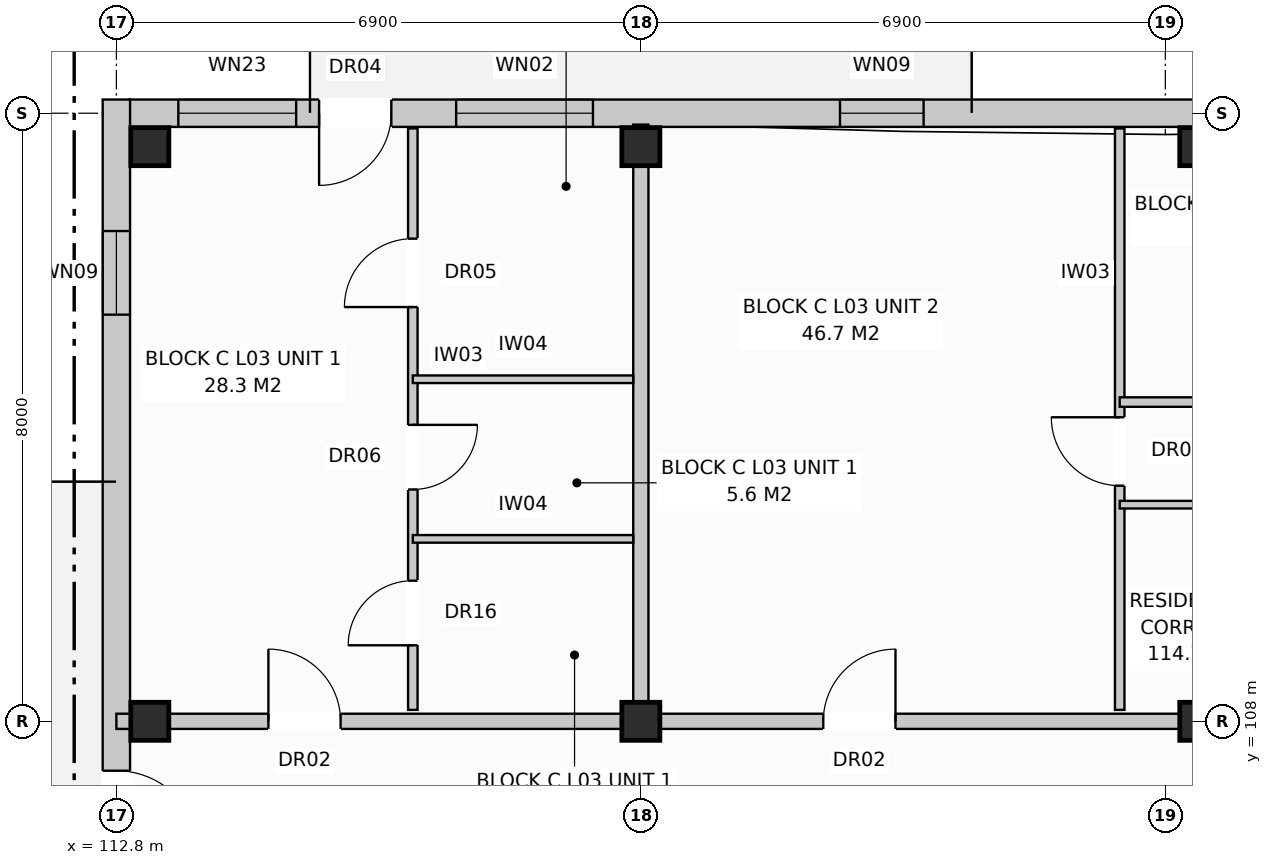
"""IFC4 building model, lengths in metres.
Left out: names, types, materials, properties, quantities, classifications, styles, units other than length and angle.
Written with IfcOpenShell. Run it as: python <this file> out.ifc"""

import sys

from ifc_helpers import new_model, si_unit, direction, frame, frame_2d, origin, origin_with_axes, origin_2d, place, context, subcontext, project, spatial, rectangle, extrude, element, fill, save


model = new_model("IFC4")
c1 = context("Model", 3, precision=1e-05, world=origin(), true_north=direction((0.0, 1.0)))
c2 = subcontext(c1, "Body", "Model", "MODEL_VIEW")
j1 = project(units=[si_unit("LENGTHUNIT", "METRE"), si_unit("PLANEANGLEUNIT", "RADIAN")], contexts=[c1])
p1 = place(None, origin())
s1 = spatial("IfcSite", under=j1, at=p1, CompositionType="ELEMENT")
p2 = place(p1, origin())
s2 = spatial("IfcBuilding", under=s1, at=p2, CompositionType="ELEMENT")
p3 = place(p2, frame((0.0, 0.0, 11.2)))
s3 = spatial("IfcBuildingStorey", under=s2, at=p3, CompositionType="ELEMENT", Elevation=11.2)
for number, where, z_axis, x_axis in (
    (1, (113.24, 108.0, 0.0), (0.0, 0.0, 1.0), (1.0, 0.0, 0.0)),
    (2, (113.24, 115.56, 0.0), (0.0, 0.0, 1.0), (1.0, 0.0, 0.0)),
    (3, (119.7, 108.0, 0.0), (0.0, 0.0, 1.0), (1.0, 0.0, 0.0)),
    (4, (119.7, 115.56, 0.0), (0.0, 0.0, 1.0), (1.0, 0.0, 0.0)),
    (5, (127.04, 108.0, 0.0), (0.0, 0.0, 1.0), (1.0, 0.0, 0.0)),
    (6, (127.04, 115.56, 0.0), (0.0, 0.0, 1.0), (1.0, 0.0, 0.0)),
):
    element("IfcColumn", number, at=place(p3, frame(where, z_axis=z_axis, x_axis=x_axis)), inside=s3, PredefinedType="COLUMN", context=c2, shape_type="SweptSolid", body=[
        extrude(rectangle(XDim=0.5, YDim=0.5, at=origin_2d()), origin(), (0.0, 0.0, 1.0), 3.2),
    ])
p4 = place(p3, frame((112.97, 116.0, 0.0), z_axis=(0.0, 0.0, 1.0), x_axis=(1.0, 0.0, 0.0)))
e7 = element("IfcWall", 7, at=p4, inside=s3, PredefinedType="STANDARD", context=c2, shape_type="SweptSolid", body=[
    extrude(rectangle(XDim=54.86, YDim=0.36, at=frame_2d((27.43, 0.0))), origin(), (0.0, 0.0, 1.0), 2.94),
])
p5 = place(p4, frame((2.497, 0.0, 0.0)))
e8 = element("IfcOpeningElement", 8, at=p5, cuts=e7, PredefinedType="OPENING", context=c2, shape_type="SweptSolid", body=[
    extrude(rectangle(XDim=0.95, YDim=2.1, at=frame_2d((0.475, 1.05))), frame((0.0, 0.192, 0.0), z_axis=(0.0, -1.0, 0.0), x_axis=(1.0, 0.0, 0.0)), (0.0, 0.0, 1.0), 0.384),
])
p6 = place(p4, frame((17.026, 0.0, 0.0)))
e9 = element("IfcOpeningElement", 9, at=p6, cuts=e7, PredefinedType="OPENING", context=c2, shape_type="SweptSolid", body=[
    extrude(rectangle(XDim=0.95, YDim=2.1, at=frame_2d((0.475, 1.05))), frame((0.0, 0.192, 0.0), z_axis=(0.0, -1.0, 0.0), x_axis=(1.0, 0.0, 0.0)), (0.0, 0.0, 1.0), 0.384),
])
p7 = place(p4, frame((30.126, 0.0, 0.0)))
e10 = element("IfcOpeningElement", 10, at=p7, cuts=e7, PredefinedType="OPENING", context=c2, shape_type="SweptSolid", body=[
    extrude(rectangle(XDim=0.95, YDim=2.1, at=frame_2d((0.475, 1.05))), frame((0.0, 0.192, 0.0), z_axis=(0.0, -1.0, 0.0), x_axis=(1.0, 0.0, 0.0)), (0.0, 0.0, 1.0), 0.384),
])
p8 = place(p4, frame((44.226, 0.0, 0.0)))
e11 = element("IfcOpeningElement", 11, at=p8, cuts=e7, PredefinedType="OPENING", context=c2, shape_type="SweptSolid", body=[
    extrude(rectangle(XDim=0.95, YDim=2.1, at=frame_2d((0.475, 1.05))), frame((0.0, 0.192, 0.0), z_axis=(0.0, -1.0, 0.0), x_axis=(1.0, 0.0, 0.0)), (0.0, 0.0, 1.0), 0.384),
])
p9 = place(p4, frame((0.645, 0.0, 0.85)))
e12 = element("IfcOpeningElement", 12, at=p9, cuts=e7, PredefinedType="OPENING", context=c2, shape_type="SweptSolid", body=[
    extrude(rectangle(XDim=1.55, YDim=1.55, at=frame_2d((0.775, 0.775))), frame((0.0, 0.192, 0.0), z_axis=(0.0, -1.0, 0.0), x_axis=(1.0, 0.0, 0.0)), (0.0, 0.0, 1.0), 0.384),
])
p10 = place(p4, frame((4.3, 0.0, 0.8)))
e13 = element("IfcOpeningElement", 13, at=p10, cuts=e7, PredefinedType="OPENING", context=c2, shape_type="SweptSolid", body=[
    extrude(rectangle(XDim=1.8, YDim=1.7, at=frame_2d((0.9, 0.85))), frame((0.0, 0.192, 0.0), z_axis=(0.0, -1.0, 0.0), x_axis=(1.0, 0.0, 0.0)), (0.0, 0.0, 1.0), 0.384),
])
p11 = place(p4, frame((9.35, 0.0, 0.72)))
e14 = element("IfcOpeningElement", 14, at=p11, cuts=e7, PredefinedType="OPENING", context=c2, shape_type="SweptSolid", body=[
    extrude(rectangle(XDim=1.1, YDim=1.5, at=frame_2d((0.55, 0.75))), frame((0.0, 0.192, 0.0), z_axis=(0.0, -1.0, 0.0), x_axis=(1.0, 0.0, 0.0)), (0.0, 0.0, 1.0), 0.384),
])
p12 = place(p4, frame((15.05, 0.0, 0.72)))
e15 = element("IfcOpeningElement", 15, at=p12, cuts=e7, PredefinedType="OPENING", context=c2, shape_type="SweptSolid", body=[
    extrude(rectangle(XDim=1.1, YDim=1.5, at=frame_2d((0.55, 0.75))), frame((0.0, 0.192, 0.0), z_axis=(0.0, -1.0, 0.0), x_axis=(1.0, 0.0, 0.0)), (0.0, 0.0, 1.0), 0.384),
])
p13 = place(p4, frame((21.1, 0.0, 0.8)))
e16 = element("IfcOpeningElement", 16, at=p13, cuts=e7, PredefinedType="OPENING", context=c2, shape_type="SweptSolid", body=[
    extrude(rectangle(XDim=1.8, YDim=1.7, at=frame_2d((0.9, 0.85))), frame((0.0, 0.192, 0.0), z_axis=(0.0, -1.0, 0.0), x_axis=(1.0, 0.0, 0.0)), (0.0, 0.0, 1.0), 0.384),
])
p14 = place(p4, frame((24.85, 0.0, 0.72)))
e17 = element("IfcOpeningElement", 17, at=p14, cuts=e7, PredefinedType="OPENING", context=c2, shape_type="SweptSolid", body=[
    extrude(rectangle(XDim=1.1, YDim=1.5, at=frame_2d((0.55, 0.75))), frame((0.0, 0.192, 0.0), z_axis=(0.0, -1.0, 0.0), x_axis=(1.0, 0.0, 0.0)), (0.0, 0.0, 1.0), 0.384),
])
p15 = place(p4, frame((28.35, 0.0, 0.72)))
e18 = element("IfcOpeningElement", 18, at=p15, cuts=e7, PredefinedType="OPENING", context=c2, shape_type="SweptSolid", body=[
    extrude(rectangle(XDim=1.1, YDim=1.5, at=frame_2d((0.55, 0.75))), frame((0.0, 0.192, 0.0), z_axis=(0.0, -1.0, 0.0), x_axis=(1.0, 0.0, 0.0)), (0.0, 0.0, 1.0), 0.384),
])
p16 = place(p4, frame((31.9, 0.0, 0.8)))
e19 = element("IfcOpeningElement", 19, at=p16, cuts=e7, PredefinedType="OPENING", context=c2, shape_type="SweptSolid", body=[
    extrude(rectangle(XDim=1.8, YDim=1.7, at=frame_2d((0.9, 0.85))), frame((0.0, 0.192, 0.0), z_axis=(0.0, -1.0, 0.0), x_axis=(1.0, 0.0, 0.0)), (0.0, 0.0, 1.0), 0.384),
])
p17 = place(p4, frame((35.55, 0.0, 0.72)))
e20 = element("IfcOpeningElement", 20, at=p17, cuts=e7, PredefinedType="OPENING", context=c2, shape_type="SweptSolid", body=[
    extrude(rectangle(XDim=1.9, YDim=1.85, at=frame_2d((0.95, 0.925))), frame((0.0, 0.192, 0.0), z_axis=(0.0, -1.0, 0.0), x_axis=(1.0, 0.0, 0.0)), (0.0, 0.0, 1.0), 0.384),
])
p18 = place(p4, frame((39.25, 0.0, 0.72)))
e21 = element("IfcOpeningElement", 21, at=p18, cuts=e7, PredefinedType="OPENING", context=c2, shape_type="SweptSolid", body=[
    extrude(rectangle(XDim=1.1, YDim=1.5, at=frame_2d((0.55, 0.75))), frame((0.0, 0.192, 0.0), z_axis=(0.0, -1.0, 0.0), x_axis=(1.0, 0.0, 0.0)), (0.0, 0.0, 1.0), 0.384),
])
p19 = place(p4, frame((42.45, 0.0, 0.72)))
e22 = element("IfcOpeningElement", 22, at=p19, cuts=e7, PredefinedType="OPENING", context=c2, shape_type="SweptSolid", body=[
    extrude(rectangle(XDim=1.1, YDim=1.5, at=frame_2d((0.55, 0.75))), frame((0.0, 0.192, 0.0), z_axis=(0.0, -1.0, 0.0), x_axis=(1.0, 0.0, 0.0)), (0.0, 0.0, 1.0), 0.384),
])
p20 = place(p4, frame((45.75, 0.0, 0.72)))
e23 = element("IfcOpeningElement", 23, at=p20, cuts=e7, PredefinedType="OPENING", context=c2, shape_type="SweptSolid", body=[
    extrude(rectangle(XDim=1.9, YDim=1.85, at=frame_2d((0.95, 0.925))), frame((0.0, 0.192, 0.0), z_axis=(0.0, -1.0, 0.0), x_axis=(1.0, 0.0, 0.0)), (0.0, 0.0, 1.0), 0.384),
])
p21 = place(p4, frame((51.85, 0.0, 0.72)))
e24 = element("IfcOpeningElement", 24, at=p21, cuts=e7, PredefinedType="OPENING", context=c2, shape_type="SweptSolid", body=[
    extrude(rectangle(XDim=1.1, YDim=1.5, at=frame_2d((0.55, 0.75))), frame((0.0, 0.192, 0.0), z_axis=(0.0, -1.0, 0.0), x_axis=(1.0, 0.0, 0.0)), (0.0, 0.0, 1.0), 0.384),
])
p22 = place(p3, frame((112.8, 97.42, 0.0), z_axis=(0.0, 0.0, 1.0), x_axis=(0.0, 1.0, 0.0)))
e25 = element("IfcWall", 25, at=p22, inside=s3, PredefinedType="STANDARD", context=c2, shape_type="SweptSolid", body=[
    extrude(rectangle(XDim=18.76, YDim=0.36, at=frame_2d((9.38, 0.0))), origin(), (0.0, 0.0, 1.0), 2.94),
])
p23 = place(p22, frame((8.83, 0.0, 0.0)))
e26 = element("IfcOpeningElement", 26, at=p23, cuts=e25, PredefinedType="OPENING", context=c2, shape_type="SweptSolid", body=[
    extrude(rectangle(XDim=1.1, YDim=2.1, at=frame_2d((0.55, 1.05))), frame((0.0, 0.192, 0.0), z_axis=(0.0, -1.0, 0.0), x_axis=(1.0, 0.0, 0.0)), (0.0, 0.0, 1.0), 0.384),
])
p24 = place(p22, frame((1.73, 0.0, 0.72)))
e27 = element("IfcOpeningElement", 27, at=p24, cuts=e25, PredefinedType="OPENING", context=c2, shape_type="SweptSolid", body=[
    extrude(rectangle(XDim=1.1, YDim=1.5, at=frame_2d((0.55, 0.75))), frame((0.0, 0.192, 0.0), z_axis=(0.0, -1.0, 0.0), x_axis=(1.0, 0.0, 0.0)), (0.0, 0.0, 1.0), 0.384),
])
p25 = place(p22, frame((15.93, 0.0, 0.72)))
e28 = element("IfcOpeningElement", 28, at=p25, cuts=e25, PredefinedType="OPENING", context=c2, shape_type="SweptSolid", body=[
    extrude(rectangle(XDim=1.1, YDim=1.5, at=frame_2d((0.55, 0.75))), frame((0.0, 0.192, 0.0), z_axis=(0.0, -1.0, 0.0), x_axis=(1.0, 0.0, 0.0)), (0.0, 0.0, 1.0), 0.384),
])
p26 = place(p3, frame((119.7, 108.15, 0.0), z_axis=(0.0, 0.0, 1.0), x_axis=(0.0, 1.0, 0.0)))
e29 = element("IfcWall", 29, at=p26, inside=s3, PredefinedType="PARTITIONING", context=c2, shape_type="SweptSolid", body=[
    extrude(rectangle(XDim=7.7, YDim=0.2, at=frame_2d((3.85, 0.0))), origin(), (0.0, 0.0, 1.0), 2.38),
])
p27 = place(p3, frame((112.8, 108.0, 0.0), z_axis=(0.0, 0.0, 1.0), x_axis=(1.0, 0.0, 0.0)))
e30 = element("IfcWall", 30, at=p27, inside=s3, PredefinedType="PARTITIONING", context=c2, shape_type="SweptSolid", body=[
    extrude(rectangle(XDim=6.9, YDim=0.2, at=frame_2d((3.45, 0.0))), origin(), (0.0, 0.0, 1.0), 2.38),
])
p28 = place(p27, frame((2.0, 0.0, 0.0)))
e31 = element("IfcOpeningElement", 31, at=p28, cuts=e30, PredefinedType="OPENING", context=c2, shape_type="SweptSolid", body=[
    extrude(rectangle(XDim=0.95, YDim=2.15, at=frame_2d((0.475, 1.075))), frame((0.0, 0.112, 0.0), z_axis=(0.0, -1.0, 0.0), x_axis=(1.0, 0.0, 0.0)), (0.0, 0.0, 1.0), 0.224),
])
p29 = place(p3, frame((116.7, 108.15, 0.0), z_axis=(0.0, 0.0, 1.0), x_axis=(0.0, 1.0, 0.0)))
e32 = element("IfcWall", 32, at=p29, inside=s3, PredefinedType="PARTITIONING", context=c2, shape_type="SweptSolid", body=[
    extrude(rectangle(XDim=7.65, YDim=0.125, at=frame_2d((3.825, 0.0))), origin(), (0.0, 0.0, 1.0), 2.94),
])
p30 = place(p29, frame((0.85, 0.0, 0.0)))
e33 = element("IfcOpeningElement", 33, at=p30, cuts=e32, PredefinedType="OPENING", context=c2, shape_type="SweptSolid", body=[
    extrude(rectangle(XDim=0.85, YDim=2.1, at=frame_2d((0.425, 1.05))), frame((0.0, 0.074, 0.0), z_axis=(0.0, -1.0, 0.0), x_axis=(1.0, 0.0, 0.0)), (0.0, 0.0, 1.0), 0.149),
])
p31 = place(p29, frame((2.9, 0.0, 0.0)))
e34 = element("IfcOpeningElement", 34, at=p31, cuts=e32, PredefinedType="OPENING", context=c2, shape_type="SweptSolid", body=[
    extrude(rectangle(XDim=0.85, YDim=2.05, at=frame_2d((0.425, 1.025))), frame((0.0, 0.074, 0.0), z_axis=(0.0, -1.0, 0.0), x_axis=(1.0, 0.0, 0.0)), (0.0, 0.0, 1.0), 0.149),
])
p32 = place(p29, frame((5.3, 0.0, 0.0)))
e35 = element("IfcOpeningElement", 35, at=p32, cuts=e32, PredefinedType="OPENING", context=c2, shape_type="SweptSolid", body=[
    extrude(rectangle(XDim=0.9, YDim=2.1, at=frame_2d((0.45, 1.05))), frame((0.0, 0.074, 0.0), z_axis=(0.0, -1.0, 0.0), x_axis=(1.0, 0.0, 0.0)), (0.0, 0.0, 1.0), 0.149),
])
for number, where, z_axis, x_axis in (
    (36, (116.7, 110.4, 0.0), (0.0, 0.0, 1.0), (1.0, 0.0, 0.0)),
    (37, (116.7, 112.5, 0.0), (0.0, 0.0, 1.0), (1.0, 0.0, 0.0)),
):
    element("IfcWall", number, at=place(p3, frame(where, z_axis=z_axis, x_axis=x_axis)), inside=s3, PredefinedType="PARTITIONING", context=c2, shape_type="SweptSolid", body=[
        extrude(rectangle(XDim=2.9, YDim=0.1, at=frame_2d((1.45, 0.0))), origin(), (0.0, 0.0, 1.0), 2.94),
    ])
p33 = place(p3, frame((119.7, 108.0, 0.0), z_axis=(0.0, 0.0, 1.0), x_axis=(1.0, 0.0, 0.0)))
e38 = element("IfcWall", 38, at=p33, inside=s3, PredefinedType="PARTITIONING", context=c2, shape_type="SweptSolid", body=[
    extrude(rectangle(XDim=20.7, YDim=0.2, at=frame_2d((10.35, 0.0))), origin(), (0.0, 0.0, 1.0), 2.38),
])
p34 = place(p33, frame((2.4, 0.0, 0.0)))
e39 = element("IfcOpeningElement", 39, at=p34, cuts=e38, PredefinedType="OPENING", context=c2, shape_type="SweptSolid", body=[
    extrude(rectangle(XDim=0.95, YDim=2.15, at=frame_2d((0.475, 1.075))), frame((0.0, 0.112, 0.0), z_axis=(0.0, -1.0, 0.0), x_axis=(1.0, 0.0, 0.0)), (0.0, 0.0, 1.0), 0.224),
])
p35 = place(p3, frame((126.0, 108.15, 0.0), z_axis=(0.0, 0.0, 1.0), x_axis=(0.0, 1.0, 0.0)))
e40 = element("IfcWall", 40, at=p35, inside=s3, PredefinedType="PARTITIONING", context=c2, shape_type="SweptSolid", body=[
    extrude(rectangle(XDim=7.65, YDim=0.125, at=frame_2d((3.825, 0.0))), origin(), (0.0, 0.0, 1.0), 2.94),
])
p36 = place(p35, frame((2.95, 0.0, 0.0)))
e41 = element("IfcOpeningElement", 41, at=p36, cuts=e40, PredefinedType="OPENING", context=c2, shape_type="SweptSolid", body=[
    extrude(rectangle(XDim=0.9, YDim=2.1, at=frame_2d((0.45, 1.05))), frame((0.0, 0.074, 0.0), z_axis=(0.0, -1.0, 0.0), x_axis=(1.0, 0.0, 0.0)), (0.0, 0.0, 1.0), 0.149),
])
p37 = place(p3, frame((126.0, 110.85, 0.0), z_axis=(0.0, 0.0, 1.0), x_axis=(1.0, 0.0, 0.0)))
e42 = element("IfcWall", 42, at=p37, inside=s3, PredefinedType="PARTITIONING", context=c2, shape_type="SweptSolid", body=[
    extrude(rectangle(XDim=14.3, YDim=0.1, at=frame_2d((7.15, 0.0))), origin(), (0.0, 0.0, 1.0), 2.94),
])
p38 = place(p37, frame((1.6, 0.0, 0.0)))
e43 = element("IfcOpeningElement", 43, at=p38, cuts=e42, PredefinedType="OPENING", context=c2, shape_type="SweptSolid", body=[
    extrude(rectangle(XDim=0.9, YDim=2.1, at=frame_2d((0.45, 1.05))), frame((0.0, 0.062, 0.0), z_axis=(0.0, -1.0, 0.0), x_axis=(1.0, 0.0, 0.0)), (0.0, 0.0, 1.0), 0.124),
])
p39 = place(p37, frame((5.1, 0.0, 0.0)))
e44 = element("IfcOpeningElement", 44, at=p39, cuts=e42, PredefinedType="OPENING", context=c2, shape_type="SweptSolid", body=[
    extrude(rectangle(XDim=0.85, YDim=2.05, at=frame_2d((0.425, 1.025))), frame((0.0, 0.062, 0.0), z_axis=(0.0, -1.0, 0.0), x_axis=(1.0, 0.0, 0.0)), (0.0, 0.0, 1.0), 0.124),
])
p40 = place(p37, frame((8.2, 0.0, 0.0)))
e45 = element("IfcOpeningElement", 45, at=p40, cuts=e42, PredefinedType="OPENING", context=c2, shape_type="SweptSolid", body=[
    extrude(rectangle(XDim=0.85, YDim=2.05, at=frame_2d((0.425, 1.025))), frame((0.0, 0.062, 0.0), z_axis=(0.0, -1.0, 0.0), x_axis=(1.0, 0.0, 0.0)), (0.0, 0.0, 1.0), 0.124),
])
p41 = place(p37, frame((11.6, 0.0, 0.0)))
e46 = element("IfcOpeningElement", 46, at=p41, cuts=e42, PredefinedType="OPENING", context=c2, shape_type="SweptSolid", body=[
    extrude(rectangle(XDim=0.85, YDim=2.05, at=frame_2d((0.425, 1.025))), frame((0.0, 0.062, 0.0), z_axis=(0.0, -1.0, 0.0), x_axis=(1.0, 0.0, 0.0)), (0.0, 0.0, 1.0), 0.124),
])
p42 = place(p3, frame((126.0, 112.2, 0.0), z_axis=(0.0, 0.0, 1.0), x_axis=(1.0, 0.0, 0.0)))
e47 = element("IfcWall", 47, at=p42, inside=s3, PredefinedType="PARTITIONING", context=c2, shape_type="SweptSolid", body=[
    extrude(rectangle(XDim=10.4, YDim=0.125, at=frame_2d((5.2, 0.0))), origin(), (0.0, 0.0, 1.0), 2.94),
])
p43 = place(p42, frame((2.0, 0.0, 0.0)))
e48 = element("IfcOpeningElement", 48, at=p43, cuts=e47, PredefinedType="OPENING", context=c2, shape_type="SweptSolid", body=[
    extrude(rectangle(XDim=0.9, YDim=2.1, at=frame_2d((0.45, 1.05))), frame((0.0, 0.074, 0.0), z_axis=(0.0, -1.0, 0.0), x_axis=(1.0, 0.0, 0.0)), (0.0, 0.0, 1.0), 0.149),
])
p44 = place(p42, frame((7.2, 0.0, 0.0)))
e49 = element("IfcOpeningElement", 49, at=p44, cuts=e47, PredefinedType="OPENING", context=c2, shape_type="SweptSolid", body=[
    extrude(rectangle(XDim=0.9, YDim=2.1, at=frame_2d((0.45, 1.05))), frame((0.0, 0.074, 0.0), z_axis=(0.0, -1.0, 0.0), x_axis=(1.0, 0.0, 0.0)), (0.0, 0.0, 1.0), 0.149),
])
p45 = place(p5, frame((0.95, 0.0, 0.0), z_axis=(0.0, 0.0, 1.0), x_axis=(-1.0, 0.0, 0.0)))
e50 = element("IfcDoor", 50, at=p45, inside=s3, OperationType="SINGLE_SWING_LEFT", PredefinedType="DOOR", context=c2, shape_type="SweptSolid", body=[
    extrude(rectangle(XDim=0.95, YDim=2.1, at=frame_2d((0.475, 1.05))), frame((0.0, 0.025, 0.0), z_axis=(0.0, -1.0, 0.0), x_axis=(1.0, 0.0, 0.0)), (0.0, 0.0, 1.0), 0.05),
])
fill(e8, e50)
p46 = place(p9, origin_with_axes())
e51 = element("IfcWindow", 51, at=p46, inside=s3, PartitioningType="SINGLE_PANEL", PredefinedType="WINDOW", context=c2, shape_type="SweptSolid", body=[
    extrude(rectangle(XDim=1.55, YDim=1.55, at=frame_2d((0.775, 0.775))), frame((0.0, 0.03, 0.0), z_axis=(0.0, -1.0, 0.0), x_axis=(1.0, 0.0, 0.0)), (0.0, 0.0, 1.0), 0.06),
])
fill(e12, e51)
p47 = place(p10, origin_with_axes())
e52 = element("IfcWindow", 52, at=p47, inside=s3, PartitioningType="SINGLE_PANEL", PredefinedType="WINDOW", context=c2, shape_type="SweptSolid", body=[
    extrude(rectangle(XDim=1.8, YDim=1.7, at=frame_2d((0.9, 0.85))), frame((0.0, 0.03, 0.0), z_axis=(0.0, -1.0, 0.0), x_axis=(1.0, 0.0, 0.0)), (0.0, 0.0, 1.0), 0.06),
])
fill(e13, e52)
p48 = place(p11, origin_with_axes())
e53 = element("IfcWindow", 53, at=p48, inside=s3, PartitioningType="SINGLE_PANEL", PredefinedType="WINDOW", context=c2, shape_type="SweptSolid", body=[
    extrude(rectangle(XDim=1.1, YDim=1.5, at=frame_2d((0.55, 0.75))), frame((0.0, 0.03, 0.0), z_axis=(0.0, -1.0, 0.0), x_axis=(1.0, 0.0, 0.0)), (0.0, 0.0, 1.0), 0.06),
])
fill(e14, e53)
p49 = place(p23, frame((1.1, 0.0, 0.0), z_axis=(0.0, 0.0, 1.0), x_axis=(-1.0, 0.0, 0.0)))
e54 = element("IfcDoor", 54, at=p49, inside=s3, OperationType="SINGLE_SWING_LEFT", PredefinedType="DOOR", context=c2, shape_type="SweptSolid", body=[
    extrude(rectangle(XDim=1.1, YDim=2.1, at=frame_2d((0.55, 1.05))), frame((0.0, 0.025, 0.0), z_axis=(0.0, -1.0, 0.0), x_axis=(1.0, 0.0, 0.0)), (0.0, 0.0, 1.0), 0.05),
])
fill(e26, e54)
p50 = place(p25, origin_with_axes())
e55 = element("IfcWindow", 55, at=p50, inside=s3, PartitioningType="SINGLE_PANEL", PredefinedType="WINDOW", context=c2, shape_type="SweptSolid", body=[
    extrude(rectangle(XDim=1.1, YDim=1.5, at=frame_2d((0.55, 0.75))), frame((0.0, 0.03, 0.0), z_axis=(0.0, -1.0, 0.0), x_axis=(1.0, 0.0, 0.0)), (0.0, 0.0, 1.0), 0.06),
])
fill(e28, e55)
p51 = place(p28, origin_with_axes())
e56 = element("IfcDoor", 56, at=p51, inside=s3, OperationType="SINGLE_SWING_LEFT", PredefinedType="DOOR", context=c2, shape_type="SweptSolid", body=[
    extrude(rectangle(XDim=0.95, YDim=2.15, at=frame_2d((0.475, 1.075))), frame((0.0, 0.025, 0.0), z_axis=(0.0, -1.0, 0.0), x_axis=(1.0, 0.0, 0.0)), (0.0, 0.0, 1.0), 0.05),
])
fill(e31, e56)
p52 = place(p30, origin_with_axes())
e57 = element("IfcDoor", 57, at=p52, inside=s3, OperationType="SINGLE_SWING_LEFT", PredefinedType="DOOR", context=c2, shape_type="SweptSolid", body=[
    extrude(rectangle(XDim=0.85, YDim=2.1, at=frame_2d((0.425, 1.05))), frame((0.0, 0.025, 0.0), z_axis=(0.0, -1.0, 0.0), x_axis=(1.0, 0.0, 0.0)), (0.0, 0.0, 1.0), 0.05),
])
fill(e33, e57)
p53 = place(p31, frame((0.85, 0.0, 0.0), z_axis=(0.0, 0.0, 1.0), x_axis=(-1.0, 0.0, 0.0)))
e58 = element("IfcDoor", 58, at=p53, inside=s3, OperationType="SINGLE_SWING_RIGHT", PredefinedType="DOOR", context=c2, shape_type="SweptSolid", body=[
    extrude(rectangle(XDim=0.85, YDim=2.05, at=frame_2d((0.425, 1.025))), frame((0.0, 0.025, 0.0), z_axis=(0.0, -1.0, 0.0), x_axis=(1.0, 0.0, 0.0)), (0.0, 0.0, 1.0), 0.05),
])
fill(e34, e58)
p54 = place(p32, origin_with_axes())
e59 = element("IfcDoor", 59, at=p54, inside=s3, OperationType="SINGLE_SWING_LEFT", PredefinedType="DOOR", context=c2, shape_type="SweptSolid", body=[
    extrude(rectangle(XDim=0.9, YDim=2.1, at=frame_2d((0.45, 1.05))), frame((0.0, 0.025, 0.0), z_axis=(0.0, -1.0, 0.0), x_axis=(1.0, 0.0, 0.0)), (0.0, 0.0, 1.0), 0.05),
])
fill(e35, e59)
p55 = place(p34, origin_with_axes())
e60 = element("IfcDoor", 60, at=p55, inside=s3, OperationType="SINGLE_SWING_RIGHT", PredefinedType="DOOR", context=c2, shape_type="SweptSolid", body=[
    extrude(rectangle(XDim=0.95, YDim=2.15, at=frame_2d((0.475, 1.075))), frame((0.0, 0.025, 0.0), z_axis=(0.0, -1.0, 0.0), x_axis=(1.0, 0.0, 0.0)), (0.0, 0.0, 1.0), 0.05),
])
fill(e39, e60)
p56 = place(p36, origin_with_axes())
e61 = element("IfcDoor", 61, at=p56, inside=s3, OperationType="SINGLE_SWING_RIGHT", PredefinedType="DOOR", context=c2, shape_type="SweptSolid", body=[
    extrude(rectangle(XDim=0.9, YDim=2.1, at=frame_2d((0.45, 1.05))), frame((0.0, 0.025, 0.0), z_axis=(0.0, -1.0, 0.0), x_axis=(1.0, 0.0, 0.0)), (0.0, 0.0, 1.0), 0.05),
])
fill(e41, e61)
save(model, sys.argv[1])
